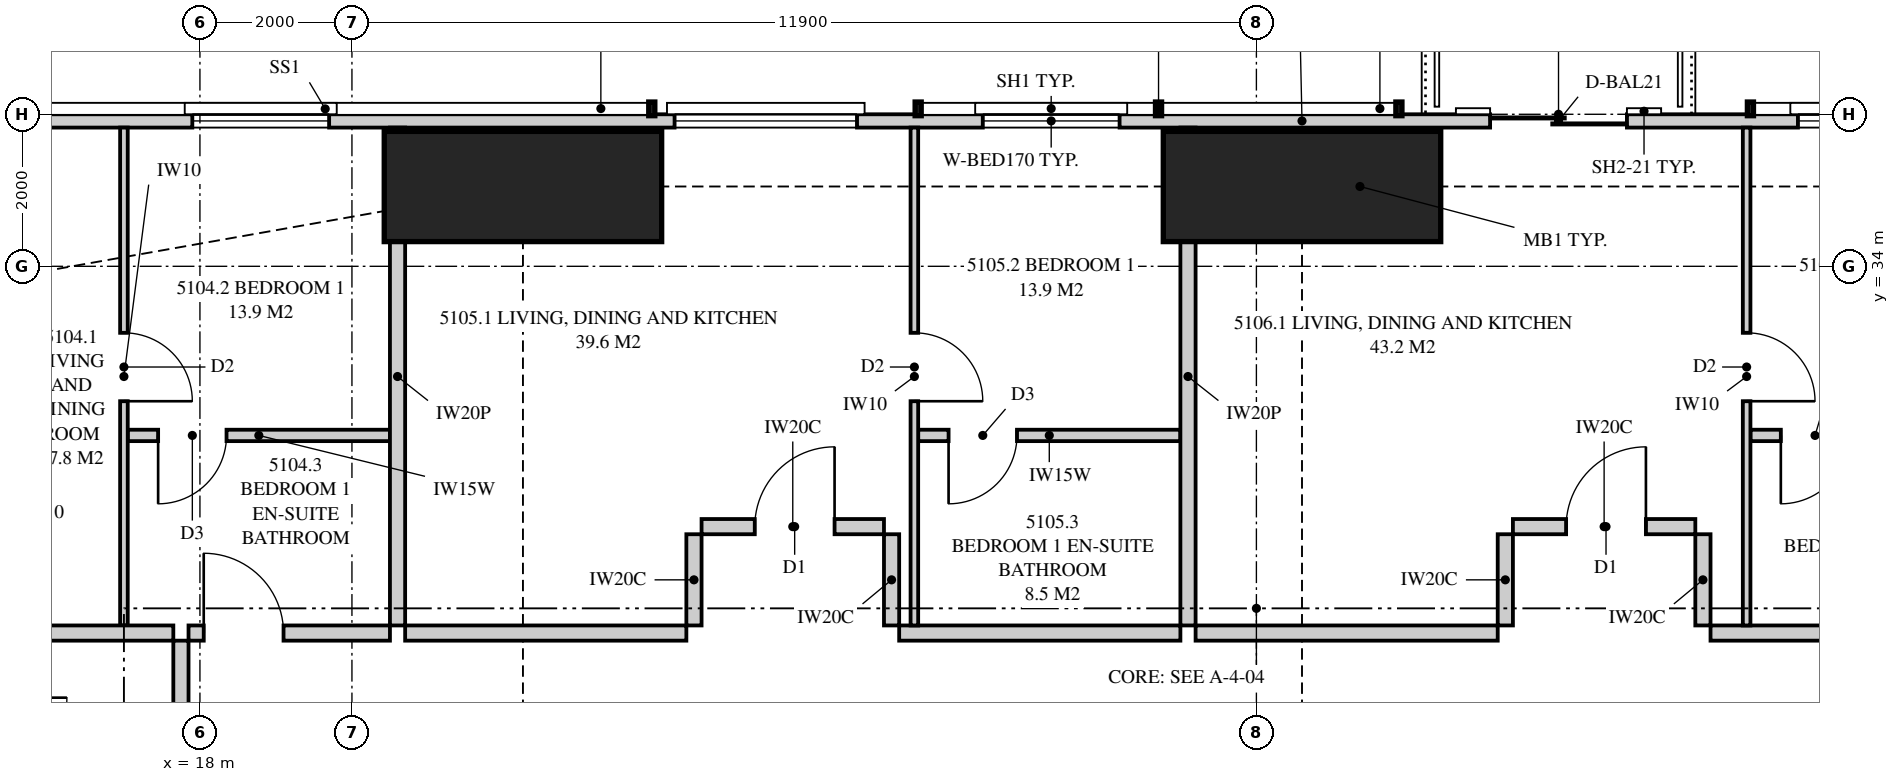
"""IFC4 building model, lengths in metres.
Left out: names, types, materials, properties, quantities, classifications, styles, units other than length and angle.
Written with IfcOpenShell. Run it as: python <this file> out.ifc"""

import sys

from ifc_helpers import new_model, si_unit, direction, frame, frame_2d, origin, origin_2d, place, context, subcontext, project, spatial, polyline, rectangle, outline, extrude, element, fill, save


model = new_model("IFC4")
c1 = context("Model", 3, precision=1e-05, world=origin(), true_north=direction((0.0, 1.0)))
c2 = subcontext(c1, "Body", "Model", "MODEL_VIEW")
j1 = project(units=[si_unit("LENGTHUNIT", "METRE"), si_unit("PLANEANGLEUNIT", "RADIAN")], contexts=[c1])
p1 = place(None, origin())
s1 = spatial("IfcSite", under=j1, at=p1, CompositionType="ELEMENT")
p2 = place(p1, origin())
s2 = spatial("IfcBuilding", under=s1, at=p2, CompositionType="ELEMENT")
p3 = place(p2, frame((0.0, 0.0, 187.85)))
s3 = spatial("IfcBuildingStorey", under=s2, at=p3, CompositionType="ELEMENT", Elevation=187.85)
for number, where, z_axis, x_axis in (
    (1, (32.5, 35.05, 0.0), (0.0, 0.0, 1.0), (0.0, 1.0, 0.0)),
    (2, (22.25, 35.05, 0.0), (0.0, 0.0, 1.0), (0.0, 1.0, 0.0)),
):
    element("IfcColumn", number, at=place(p3, frame(where, z_axis=z_axis, x_axis=x_axis)), inside=s3, PredefinedType="COLUMN", context=c2, shape_type="SweptSolid", body=[
        extrude(rectangle(XDim=1.45, YDim=3.65, at=origin_2d()), origin(), (0.0, 0.0, 1.0), 3.35),
    ])
p4 = place(p3, frame((49.949, 35.913, 0.0), z_axis=(0.0, 0.0, 1.0), x_axis=(-1.0, 0.0, 0.0)))
e3 = element("IfcWall", 3, at=p4, inside=s3, PredefinedType="SOLIDWALL", context=c2, shape_type="SweptSolid", body=[
    extrude(outline(polyline([(0.0, 0.0), (34.897, 0.0), (34.897, 3.11), (27.91, 3.11), (27.91, 2.15), (27.836, 2.15), (27.836, 3.11), (27.699, 3.11), (27.699, 2.15), (7.199, 2.15), (7.199, 3.11), (7.062, 3.11), (7.062, 2.15), (6.987, 2.15), (6.987, 3.11), (0.0, 3.11), (0.0, 0.0)])), frame((0.0, 0.087, 0.0), z_axis=(0.0, -1.0, 0.0), x_axis=(1.0, 0.0, 0.0)), (0.0, 0.0, 1.0), 0.175),
])
p5 = place(p4, frame((2.75, 0.0, 0.4)))
e4 = element("IfcOpeningElement", 4, at=p5, cuts=e3, PredefinedType="OPENING", context=c2, shape_type="SweptSolid", body=[
    extrude(rectangle(XDim=2.4, YDim=1.7, at=frame_2d((1.2, 0.85))), frame((0.0, 0.097, 0.0), z_axis=(0.0, -1.0, 0.0), x_axis=(1.0, 0.0, 0.0)), (0.0, 0.0, 1.0), 0.195),
])
p6 = place(p4, frame((9.124, 0.0, 0.4)))
e5 = element("IfcOpeningElement", 5, at=p6, cuts=e3, PredefinedType="OPENING", context=c2, shape_type="SweptSolid", body=[
    extrude(rectangle(XDim=1.8, YDim=1.7, at=frame_2d((0.9, 0.85))), frame((0.0, 0.097, 0.0), z_axis=(0.0, -1.0, 0.0), x_axis=(1.0, 0.0, 0.0)), (0.0, 0.0, 1.0), 0.195),
])
p7 = place(p4, frame((13.174, 0.0, 0.0)))
e6 = element("IfcOpeningElement", 6, at=p7, cuts=e3, PredefinedType="OPENING", context=c2, shape_type="SweptSolid", body=[
    extrude(rectangle(XDim=1.8, YDim=2.1, at=frame_2d((0.9, 1.05))), frame((0.0, 0.097, 0.0), z_axis=(0.0, -1.0, 0.0), x_axis=(1.0, 0.0, 0.0)), (0.0, 0.0, 1.0), 0.195),
])
p8 = place(p4, frame((19.849, 0.0, 0.4)))
e7 = element("IfcOpeningElement", 7, at=p8, cuts=e3, PredefinedType="OPENING", context=c2, shape_type="SweptSolid", body=[
    extrude(rectangle(XDim=1.8, YDim=1.7, at=frame_2d((0.9, 0.85))), frame((0.0, 0.097, 0.0), z_axis=(0.0, -1.0, 0.0), x_axis=(1.0, 0.0, 0.0)), (0.0, 0.0, 1.0), 0.195),
])
p9 = place(p4, frame((23.304, 0.0, 0.4)))
e8 = element("IfcOpeningElement", 8, at=p9, cuts=e3, PredefinedType="OPENING", context=c2, shape_type="SweptSolid", body=[
    extrude(rectangle(XDim=2.4, YDim=1.7, at=frame_2d((1.2, 0.85))), frame((0.0, 0.097, 0.0), z_axis=(0.0, -1.0, 0.0), x_axis=(1.0, 0.0, 0.0)), (0.0, 0.0, 1.0), 0.195),
])
p10 = place(p4, frame((30.249, 0.0, 0.4)))
e9 = element("IfcOpeningElement", 9, at=p10, cuts=e3, PredefinedType="OPENING", context=c2, shape_type="SweptSolid", body=[
    extrude(rectangle(XDim=1.8, YDim=1.7, at=frame_2d((0.9, 0.85))), frame((0.0, 0.097, 0.0), z_axis=(0.0, -1.0, 0.0), x_axis=(1.0, 0.0, 0.0)), (0.0, 0.0, 1.0), 0.195),
])
p11 = place(p3, frame((20.6, 35.825, 0.0), z_axis=(0.0, 0.0, 1.0), x_axis=(0.0, -1.0, 0.0)))
e10 = element("IfcWall", 10, at=p11, inside=s3, PredefinedType="PARTITIONING", context=c2, shape_type="SweptSolid", body=[
    extrude(outline(polyline([(0.0, 0.0), (6.55, 0.0), (6.55, 3.11), (1.991, 3.11), (1.991, 2.15), (0.143, 2.15), (0.143, 3.11), (0.0, 3.11), (0.0, 0.0)])), frame((0.0, 0.1, 0.0), z_axis=(0.0, -1.0, 0.0), x_axis=(1.0, 0.0, 0.0)), (0.0, 0.0, 1.0), 0.2),
])
p12 = place(p3, frame((17.85, 29.175, 0.0), z_axis=(0.0, 0.0, 1.0), x_axis=(1.0, 0.0, 0.0)))
e11 = element("IfcWall", 11, at=p12, inside=s3, PredefinedType="PARTITIONING", context=c2, shape_type="SweptSolid", body=[
    extrude(rectangle(XDim=2.65, YDim=0.2, at=frame_2d((1.325, 0.0))), origin(), (0.0, 0.0, 1.0), 3.11),
])
p13 = place(p12, frame((0.2, 0.0, 0.0)))
e12 = element("IfcOpeningElement", 12, at=p13, cuts=e11, PredefinedType="OPENING", context=c2, shape_type="SweptSolid", body=[
    extrude(rectangle(XDim=1.05, YDim=2.2, at=frame_2d((0.525, 1.1))), frame((0.0, 0.11, 0.0), z_axis=(0.0, -1.0, 0.0), x_axis=(1.0, 0.0, 0.0)), (0.0, 0.0, 1.0), 0.22),
])
p14 = place(p3, frame((17.0, 35.825, 0.0), z_axis=(0.0, 0.0, 1.0), x_axis=(0.0, -1.0, 0.0)))
e13 = element("IfcWall", 13, at=p14, inside=s3, PredefinedType="PARTITIONING", context=c2, shape_type="SweptSolid", body=[
    extrude(outline(polyline([(0.0, 0.0), (6.55, 0.0), (6.55, 3.11), (2.578, 3.11), (2.578, 2.15), (0.831, 2.15), (0.831, 3.11), (0.0, 3.11), (0.0, 0.0)])), frame((0.0, 0.05, 0.0), z_axis=(0.0, -1.0, 0.0), x_axis=(1.0, 0.0, 0.0)), (0.0, 0.0, 1.0), 0.1),
])
p15 = place(p14, frame((2.7, 0.0, 0.0)))
e14 = element("IfcOpeningElement", 14, at=p15, cuts=e13, PredefinedType="OPENING", context=c2, shape_type="SweptSolid", body=[
    extrude(rectangle(XDim=0.9, YDim=2.1, at=frame_2d((0.45, 1.05))), frame((0.0, 0.06, 0.0), z_axis=(0.0, -1.0, 0.0), x_axis=(1.0, 0.0, 0.0)), (0.0, 0.0, 1.0), 0.12),
])
p16 = place(p3, frame((17.05, 31.775, 0.0), z_axis=(0.0, 0.0, 1.0), x_axis=(1.0, 0.0, 0.0)))
e15 = element("IfcWall", 15, at=p16, inside=s3, PredefinedType="PLUMBINGWALL", context=c2, shape_type="SweptSolid", body=[
    extrude(rectangle(XDim=3.45, YDim=0.15, at=frame_2d((1.725, 0.0))), origin(), (0.0, 0.0, 1.0), 3.11),
])
p17 = place(p16, frame((0.4, 0.0, 0.0)))
e16 = element("IfcOpeningElement", 16, at=p17, cuts=e15, PredefinedType="OPENING", context=c2, shape_type="SweptSolid", body=[
    extrude(rectangle(XDim=0.9, YDim=2.1, at=frame_2d((0.45, 1.05))), frame((0.0, 0.085, 0.0), z_axis=(0.0, -1.0, 0.0), x_axis=(1.0, 0.0, 0.0)), (0.0, 0.0, 1.0), 0.17),
])
p18 = place(p3, frame((31.0, 35.825, 0.0), z_axis=(0.0, 0.0, 1.0), x_axis=(0.0, -1.0, 0.0)))
e17 = element("IfcWall", 17, at=p18, inside=s3, PredefinedType="PARTITIONING", context=c2, shape_type="SweptSolid", body=[
    extrude(outline(polyline([(0.0, 0.0), (6.55, 0.0), (6.55, 3.11), (1.685, 3.11), (1.685, 2.15), (0.0, 2.15), (0.0, 3.11), (0.0, 0.0)])), frame((0.0, 0.1, 0.0), z_axis=(0.0, -1.0, 0.0), x_axis=(1.0, 0.0, 0.0)), (0.0, 0.0, 1.0), 0.2),
])
p19 = place(p3, frame((20.7, 29.175, 0.0), z_axis=(0.0, 0.0, 1.0), x_axis=(1.0, 0.0, 0.0)))
e18 = element("IfcWall", 18, at=p19, inside=s3, PredefinedType="PARTITIONING", context=c2, shape_type="SweptSolid", body=[
    extrude(outline(polyline([(0.0, 0.0), (3.7, 0.0), (3.7, 3.11), (1.887, 3.11), (1.887, 2.541), (1.213, 2.541), (1.213, 3.11), (0.0, 3.11), (0.0, 0.0)])), frame((0.0, 0.1, 0.0), z_axis=(0.0, -1.0, 0.0), x_axis=(1.0, 0.0, 0.0)), (0.0, 0.0, 1.0), 0.2),
])
p20 = place(p3, frame((27.4, 35.825, 0.0), z_axis=(0.0, 0.0, 1.0), x_axis=(0.0, -1.0, 0.0)))
e19 = element("IfcWall", 19, at=p20, inside=s3, PredefinedType="PARTITIONING", context=c2, shape_type="SweptSolid", body=[
    extrude(outline(polyline([(0.0, 0.0), (6.55, 0.0), (6.55, 3.11), (1.635, 3.11), (1.635, 2.15), (0.0, 2.15), (0.0, 3.11), (0.0, 0.0)])), frame((0.0, 0.05, 0.0), z_axis=(0.0, -1.0, 0.0), x_axis=(1.0, 0.0, 0.0)), (0.0, 0.0, 1.0), 0.1),
])
p21 = place(p20, frame((2.7, 0.0, 0.0)))
e20 = element("IfcOpeningElement", 20, at=p21, cuts=e19, PredefinedType="OPENING", context=c2, shape_type="SweptSolid", body=[
    extrude(rectangle(XDim=0.9, YDim=2.1, at=frame_2d((0.45, 1.05))), frame((0.0, 0.06, 0.0), z_axis=(0.0, -1.0, 0.0), x_axis=(1.0, 0.0, 0.0)), (0.0, 0.0, 1.0), 0.12),
])
p22 = place(p3, frame((27.45, 31.775, 0.0), z_axis=(0.0, 0.0, 1.0), x_axis=(1.0, 0.0, 0.0)))
e21 = element("IfcWall", 21, at=p22, inside=s3, PredefinedType="PLUMBINGWALL", context=c2, shape_type="SweptSolid", body=[
    extrude(rectangle(XDim=3.45, YDim=0.15, at=frame_2d((1.725, 0.0))), origin(), (0.0, 0.0, 1.0), 3.11),
])
p23 = place(p22, frame((0.4, 0.0, 0.0)))
e22 = element("IfcOpeningElement", 22, at=p23, cuts=e21, PredefinedType="OPENING", context=c2, shape_type="SweptSolid", body=[
    extrude(rectangle(XDim=0.9, YDim=2.1, at=frame_2d((0.45, 1.05))), frame((0.0, 0.085, 0.0), z_axis=(0.0, -1.0, 0.0), x_axis=(1.0, 0.0, 0.0)), (0.0, 0.0, 1.0), 0.17),
])
p24 = place(p3, frame((31.1, 29.175, 0.0), z_axis=(0.0, 0.0, 1.0), x_axis=(1.0, 0.0, 0.0)))
e23 = element("IfcWall", 23, at=p24, inside=s3, PredefinedType="PARTITIONING", context=c2, shape_type="SweptSolid", body=[
    extrude(outline(polyline([(0.0, 0.0), (3.975, 0.0), (3.975, 3.11), (1.737, 3.11), (1.737, 2.541), (1.062, 2.541), (1.062, 3.11), (0.0, 3.11), (0.0, 0.0)])), frame((0.0, 0.1, 0.0), z_axis=(0.0, -1.0, 0.0), x_axis=(1.0, 0.0, 0.0)), (0.0, 0.0, 1.0), 0.2),
])
p25 = place(p3, frame((38.35, 35.825, 0.0), z_axis=(0.0, 0.0, 1.0), x_axis=(0.0, -1.0, 0.0)))
e24 = element("IfcWall", 24, at=p25, inside=s3, PredefinedType="PARTITIONING", context=c2, shape_type="SweptSolid", body=[
    extrude(outline(polyline([(0.0, 0.0), (6.55, 0.0), (6.55, 3.11), (1.635, 3.11), (1.635, 2.15), (0.0, 2.15), (0.0, 3.11), (0.0, 0.0)])), frame((0.0, 0.05, 0.0), z_axis=(0.0, -1.0, 0.0), x_axis=(1.0, 0.0, 0.0)), (0.0, 0.0, 1.0), 0.1),
])
p26 = place(p25, frame((2.7, 0.0, 0.0)))
e25 = element("IfcOpeningElement", 25, at=p26, cuts=e24, PredefinedType="OPENING", context=c2, shape_type="SweptSolid", body=[
    extrude(rectangle(XDim=0.9, YDim=2.1, at=frame_2d((0.45, 1.05))), frame((0.0, 0.06, 0.0), z_axis=(0.0, -1.0, 0.0), x_axis=(1.0, 0.0, 0.0)), (0.0, 0.0, 1.0), 0.12),
])
p27 = place(p3, frame((38.4, 31.775, 0.0), z_axis=(0.0, 0.0, 1.0), x_axis=(1.0, 0.0, 0.0)))
e26 = element("IfcWall", 26, at=p27, inside=s3, PredefinedType="PLUMBINGWALL", context=c2, shape_type="SweptSolid", body=[
    extrude(rectangle(XDim=3.45, YDim=0.15, at=frame_2d((1.725, 0.0))), origin(), (0.0, 0.0, 1.0), 3.11),
])
p28 = place(p27, frame((0.4, 0.0, 0.0)))
e27 = element("IfcOpeningElement", 27, at=p28, cuts=e26, PredefinedType="OPENING", context=c2, shape_type="SweptSolid", body=[
    extrude(rectangle(XDim=0.9, YDim=2.1, at=frame_2d((0.45, 1.05))), frame((0.0, 0.085, 0.0), z_axis=(0.0, -1.0, 0.0), x_axis=(1.0, 0.0, 0.0)), (0.0, 0.0, 1.0), 0.17),
])
p29 = place(p3, frame((12.0, 29.175, 0.0), z_axis=(0.0, 0.0, 1.0), x_axis=(1.0, 0.0, 0.0)))
e28 = element("IfcWall", 28, at=p29, inside=s3, PredefinedType="PARTITIONING", context=c2, shape_type="SweptSolid", body=[
    extrude(outline(polyline([(0.0, 0.0), (5.65, 0.0), (5.65, 3.11), (2.547, 3.11), (2.547, 2.15), (0.703, 2.15), (0.703, 3.11), (0.0, 3.11), (0.0, 0.0)])), frame((0.0, 0.1, 0.0), z_axis=(0.0, -1.0, 0.0), x_axis=(1.0, 0.0, 0.0)), (0.0, 0.0, 1.0), 0.2),
])
p30 = place(p3, frame((17.75, 7.925, 0.0), z_axis=(0.0, 0.0, 1.0), x_axis=(0.0, 1.0, 0.0)))
e29 = element("IfcWall", 29, at=p30, inside=s3, PredefinedType="PARTITIONING", context=c2, shape_type="SweptSolid", body=[
    extrude(outline(polyline([(0.0, 0.0), (21.15, 0.0), (21.15, 3.11), (17.412, 3.11), (17.412, 2.541), (16.738, 2.541), (16.738, 3.11), (5.412, 3.11), (5.412, 2.541), (4.738, 2.541), (4.738, 3.11), (0.0, 3.11), (0.0, 0.0)])), frame((0.0, 0.1, 0.0), z_axis=(0.0, -1.0, 0.0), x_axis=(1.0, 0.0, 0.0)), (0.0, 0.0, 1.0), 0.2),
])
p31 = place(p30, frame((16.25, 0.0, 0.0)))
e30 = element("IfcOpeningElement", 30, at=p31, cuts=e29, PredefinedType="OPENING", context=c2, shape_type="SweptSolid", body=[
    extrude(rectangle(XDim=1.05, YDim=2.2, at=frame_2d((0.525, 1.1))), frame((0.0, 0.11, 0.0), z_axis=(0.0, -1.0, 0.0), x_axis=(1.0, 0.0, 0.0)), (0.0, 0.0, 1.0), 0.22),
])
p32 = place(p3, frame((27.2, 29.175, 0.0), z_axis=(0.0, 0.0, 1.0), x_axis=(1.0, 0.0, 0.0)))
e31 = element("IfcWall", 31, at=p32, inside=s3, PredefinedType="PARTITIONING", context=c2, shape_type="SweptSolid", body=[
    extrude(rectangle(XDim=3.7, YDim=0.2, at=frame_2d((1.85, 0.0))), origin(), (0.0, 0.0, 1.0), 3.11),
])
p33 = place(p3, frame((24.6, 30.575, 0.0), z_axis=(0.0, 0.0, 1.0), x_axis=(1.0, 0.0, 0.0)))
e32 = element("IfcWall", 32, at=p33, inside=s3, PredefinedType="PARTITIONING", context=c2, shape_type="SweptSolid", body=[
    extrude(rectangle(XDim=2.4, YDim=0.2, at=frame_2d((1.2, 0.0))), origin(), (0.0, 0.0, 1.0), 3.11),
])
p34 = place(p33, frame((0.7, 0.0, 0.0)))
e33 = element("IfcOpeningElement", 33, at=p34, cuts=e32, PredefinedType="OPENING", context=c2, shape_type="SweptSolid", body=[
    extrude(rectangle(XDim=1.05, YDim=2.2, at=frame_2d((0.525, 1.1))), frame((0.0, 0.11, 0.0), z_axis=(0.0, -1.0, 0.0), x_axis=(1.0, 0.0, 0.0)), (0.0, 0.0, 1.0), 0.22),
])
for number, where, z_axis, x_axis in (
    (34, (24.5, 29.275, 0.0), (0.0, 0.0, 1.0), (0.0, 1.0, 0.0)),
    (35, (27.1, 29.275, 0.0), (0.0, 0.0, 1.0), (0.0, 1.0, 0.0)),
):
    element("IfcWall", number, at=place(p3, frame(where, z_axis=z_axis, x_axis=x_axis)), inside=s3, PredefinedType="PARTITIONING", context=c2, shape_type="SweptSolid", body=[
        extrude(rectangle(XDim=1.2, YDim=0.2, at=frame_2d((0.6, 0.0))), origin(), (0.0, 0.0, 1.0), 3.11),
    ])
p35 = place(p3, frame((37.875, 29.175, 0.0), z_axis=(0.0, 0.0, 1.0), x_axis=(1.0, 0.0, 0.0)))
e36 = element("IfcWall", 36, at=p35, inside=s3, PredefinedType="PARTITIONING", context=c2, shape_type="SweptSolid", body=[
    extrude(rectangle(XDim=3.975, YDim=0.2, at=frame_2d((1.988, 0.0))), origin(), (0.0, 0.0, 1.0), 3.11),
])
p36 = place(p3, frame((35.275, 30.575, 0.0), z_axis=(0.0, 0.0, 1.0), x_axis=(1.0, 0.0, 0.0)))
e37 = element("IfcWall", 37, at=p36, inside=s3, PredefinedType="PARTITIONING", context=c2, shape_type="SweptSolid", body=[
    extrude(rectangle(XDim=2.4, YDim=0.2, at=frame_2d((1.2, 0.0))), origin(), (0.0, 0.0, 1.0), 3.11),
])
p37 = place(p36, frame((0.7, 0.0, 0.0)))
e38 = element("IfcOpeningElement", 38, at=p37, cuts=e37, PredefinedType="OPENING", context=c2, shape_type="SweptSolid", body=[
    extrude(rectangle(XDim=1.05, YDim=2.2, at=frame_2d((0.525, 1.1))), frame((0.0, 0.11, 0.0), z_axis=(0.0, -1.0, 0.0), x_axis=(1.0, 0.0, 0.0)), (0.0, 0.0, 1.0), 0.22),
])
for number, where, z_axis, x_axis in (
    (39, (35.175, 29.275, 0.0), (0.0, 0.0, 1.0), (0.0, 1.0, 0.0)),
    (40, (37.775, 29.275, 0.0), (0.0, 0.0, 1.0), (0.0, 1.0, 0.0)),
):
    element("IfcWall", number, at=place(p3, frame(where, z_axis=z_axis, x_axis=x_axis)), inside=s3, PredefinedType="PARTITIONING", context=c2, shape_type="SweptSolid", body=[
        extrude(rectangle(XDim=1.2, YDim=0.2, at=frame_2d((0.6, 0.0))), origin(), (0.0, 0.0, 1.0), 3.11),
    ])
p38 = place(p6, origin())
e41 = element("IfcWindow", 41, at=p38, inside=s3, PartitioningType="SINGLE_PANEL", PredefinedType="WINDOW", context=c2, shape_type="SweptSolid", body=[
    extrude(rectangle(XDim=1.8, YDim=1.7, at=frame_2d((0.9, 0.85))), frame((0.0, 0.03, 0.0), z_axis=(0.0, -1.0, 0.0), x_axis=(1.0, 0.0, 0.0)), (0.0, 0.0, 1.0), 0.06),
])
fill(e5, e41)
p39 = place(p7, origin())
e42 = element("IfcDoor", 42, at=p39, inside=s3, OperationType="SLIDING_TO_LEFT", PredefinedType="DOOR", context=c2, shape_type="SweptSolid", body=[
    extrude(rectangle(XDim=1.8, YDim=2.1, at=frame_2d((0.9, 1.05))), frame((0.0, 0.025, 0.0), z_axis=(0.0, -1.0, 0.0), x_axis=(1.0, 0.0, 0.0)), (0.0, 0.0, 1.0), 0.05),
])
fill(e6, e42)
p40 = place(p8, origin())
e43 = element("IfcWindow", 43, at=p40, inside=s3, PartitioningType="SINGLE_PANEL", PredefinedType="WINDOW", context=c2, shape_type="SweptSolid", body=[
    extrude(rectangle(XDim=1.8, YDim=1.7, at=frame_2d((0.9, 0.85))), frame((0.0, 0.03, 0.0), z_axis=(0.0, -1.0, 0.0), x_axis=(1.0, 0.0, 0.0)), (0.0, 0.0, 1.0), 0.06),
])
fill(e7, e43)
p41 = place(p9, origin())
e44 = element("IfcWindow", 44, at=p41, inside=s3, PartitioningType="SINGLE_PANEL", PredefinedType="WINDOW", context=c2, shape_type="SweptSolid", body=[
    extrude(rectangle(XDim=2.4, YDim=1.7, at=frame_2d((1.2, 0.85))), frame((0.0, 0.03, 0.0), z_axis=(0.0, -1.0, 0.0), x_axis=(1.0, 0.0, 0.0)), (0.0, 0.0, 1.0), 0.06),
])
fill(e8, e44)
p42 = place(p10, origin())
e45 = element("IfcWindow", 45, at=p42, inside=s3, PartitioningType="SINGLE_PANEL", PredefinedType="WINDOW", context=c2, shape_type="SweptSolid", body=[
    extrude(rectangle(XDim=1.8, YDim=1.7, at=frame_2d((0.9, 0.85))), frame((0.0, 0.03, 0.0), z_axis=(0.0, -1.0, 0.0), x_axis=(1.0, 0.0, 0.0)), (0.0, 0.0, 1.0), 0.06),
])
fill(e9, e45)
p43 = place(p13, origin())
e46 = element("IfcDoor", 46, at=p43, inside=s3, OperationType="SINGLE_SWING_LEFT", PredefinedType="DOOR", context=c2, shape_type="SweptSolid", body=[
    extrude(rectangle(XDim=1.05, YDim=2.2, at=frame_2d((0.525, 1.1))), frame((0.0, 0.025, 0.0), z_axis=(0.0, -1.0, 0.0), x_axis=(1.0, 0.0, 0.0)), (0.0, 0.0, 1.0), 0.05),
])
fill(e12, e46)
p44 = place(p15, origin())
e47 = element("IfcDoor", 47, at=p44, inside=s3, OperationType="SINGLE_SWING_RIGHT", PredefinedType="DOOR", context=c2, shape_type="SweptSolid", body=[
    extrude(rectangle(XDim=0.9, YDim=2.1, at=frame_2d((0.45, 1.05))), frame((0.0, 0.025, 0.0), z_axis=(0.0, -1.0, 0.0), x_axis=(1.0, 0.0, 0.0)), (0.0, 0.0, 1.0), 0.05),
])
fill(e14, e47)
p45 = place(p17, frame((0.9, 0.0, 0.0), z_axis=(0.0, 0.0, 1.0), x_axis=(-1.0, 0.0, 0.0)))
e48 = element("IfcDoor", 48, at=p45, inside=s3, OperationType="SINGLE_SWING_RIGHT", PredefinedType="DOOR", context=c2, shape_type="SweptSolid", body=[
    extrude(rectangle(XDim=0.9, YDim=2.1, at=frame_2d((0.45, 1.05))), frame((0.0, 0.025, 0.0), z_axis=(0.0, -1.0, 0.0), x_axis=(1.0, 0.0, 0.0)), (0.0, 0.0, 1.0), 0.05),
])
fill(e16, e48)
p46 = place(p34, origin())
e49 = element("IfcDoor", 49, at=p46, inside=s3, OperationType="SINGLE_SWING_RIGHT", PredefinedType="DOOR", context=c2, shape_type="SweptSolid", body=[
    extrude(rectangle(XDim=1.05, YDim=2.2, at=frame_2d((0.525, 1.1))), frame((0.0, 0.025, 0.0), z_axis=(0.0, -1.0, 0.0), x_axis=(1.0, 0.0, 0.0)), (0.0, 0.0, 1.0), 0.05),
])
fill(e33, e49)
p47 = place(p21, origin())
e50 = element("IfcDoor", 50, at=p47, inside=s3, OperationType="SINGLE_SWING_RIGHT", PredefinedType="DOOR", context=c2, shape_type="SweptSolid", body=[
    extrude(rectangle(XDim=0.9, YDim=2.1, at=frame_2d((0.45, 1.05))), frame((0.0, 0.025, 0.0), z_axis=(0.0, -1.0, 0.0), x_axis=(1.0, 0.0, 0.0)), (0.0, 0.0, 1.0), 0.05),
])
fill(e20, e50)
p48 = place(p23, frame((0.9, 0.0, 0.0), z_axis=(0.0, 0.0, 1.0), x_axis=(-1.0, 0.0, 0.0)))
e51 = element("IfcDoor", 51, at=p48, inside=s3, OperationType="SINGLE_SWING_RIGHT", PredefinedType="DOOR", context=c2, shape_type="SweptSolid", body=[
    extrude(rectangle(XDim=0.9, YDim=2.1, at=frame_2d((0.45, 1.05))), frame((0.0, 0.025, 0.0), z_axis=(0.0, -1.0, 0.0), x_axis=(1.0, 0.0, 0.0)), (0.0, 0.0, 1.0), 0.05),
])
fill(e22, e51)
p49 = place(p37, origin())
e52 = element("IfcDoor", 52, at=p49, inside=s3, OperationType="SINGLE_SWING_RIGHT", PredefinedType="DOOR", context=c2, shape_type="SweptSolid", body=[
    extrude(rectangle(XDim=1.05, YDim=2.2, at=frame_2d((0.525, 1.1))), frame((0.0, 0.025, 0.0), z_axis=(0.0, -1.0, 0.0), x_axis=(1.0, 0.0, 0.0)), (0.0, 0.0, 1.0), 0.05),
])
fill(e38, e52)
p50 = place(p26, origin())
e53 = element("IfcDoor", 53, at=p50, inside=s3, OperationType="SINGLE_SWING_RIGHT", PredefinedType="DOOR", context=c2, shape_type="SweptSolid", body=[
    extrude(rectangle(XDim=0.9, YDim=2.1, at=frame_2d((0.45, 1.05))), frame((0.0, 0.025, 0.0), z_axis=(0.0, -1.0, 0.0), x_axis=(1.0, 0.0, 0.0)), (0.0, 0.0, 1.0), 0.05),
])
fill(e25, e53)
p51 = place(p28, frame((0.9, 0.0, 0.0), z_axis=(0.0, 0.0, 1.0), x_axis=(-1.0, 0.0, 0.0)))
e54 = element("IfcDoor", 54, at=p51, inside=s3, OperationType="SINGLE_SWING_RIGHT", PredefinedType="DOOR", context=c2, shape_type="SweptSolid", body=[
    extrude(rectangle(XDim=0.9, YDim=2.1, at=frame_2d((0.45, 1.05))), frame((0.0, 0.025, 0.0), z_axis=(0.0, -1.0, 0.0), x_axis=(1.0, 0.0, 0.0)), (0.0, 0.0, 1.0), 0.05),
])
fill(e27, e54)
save(model, sys.argv[1])
